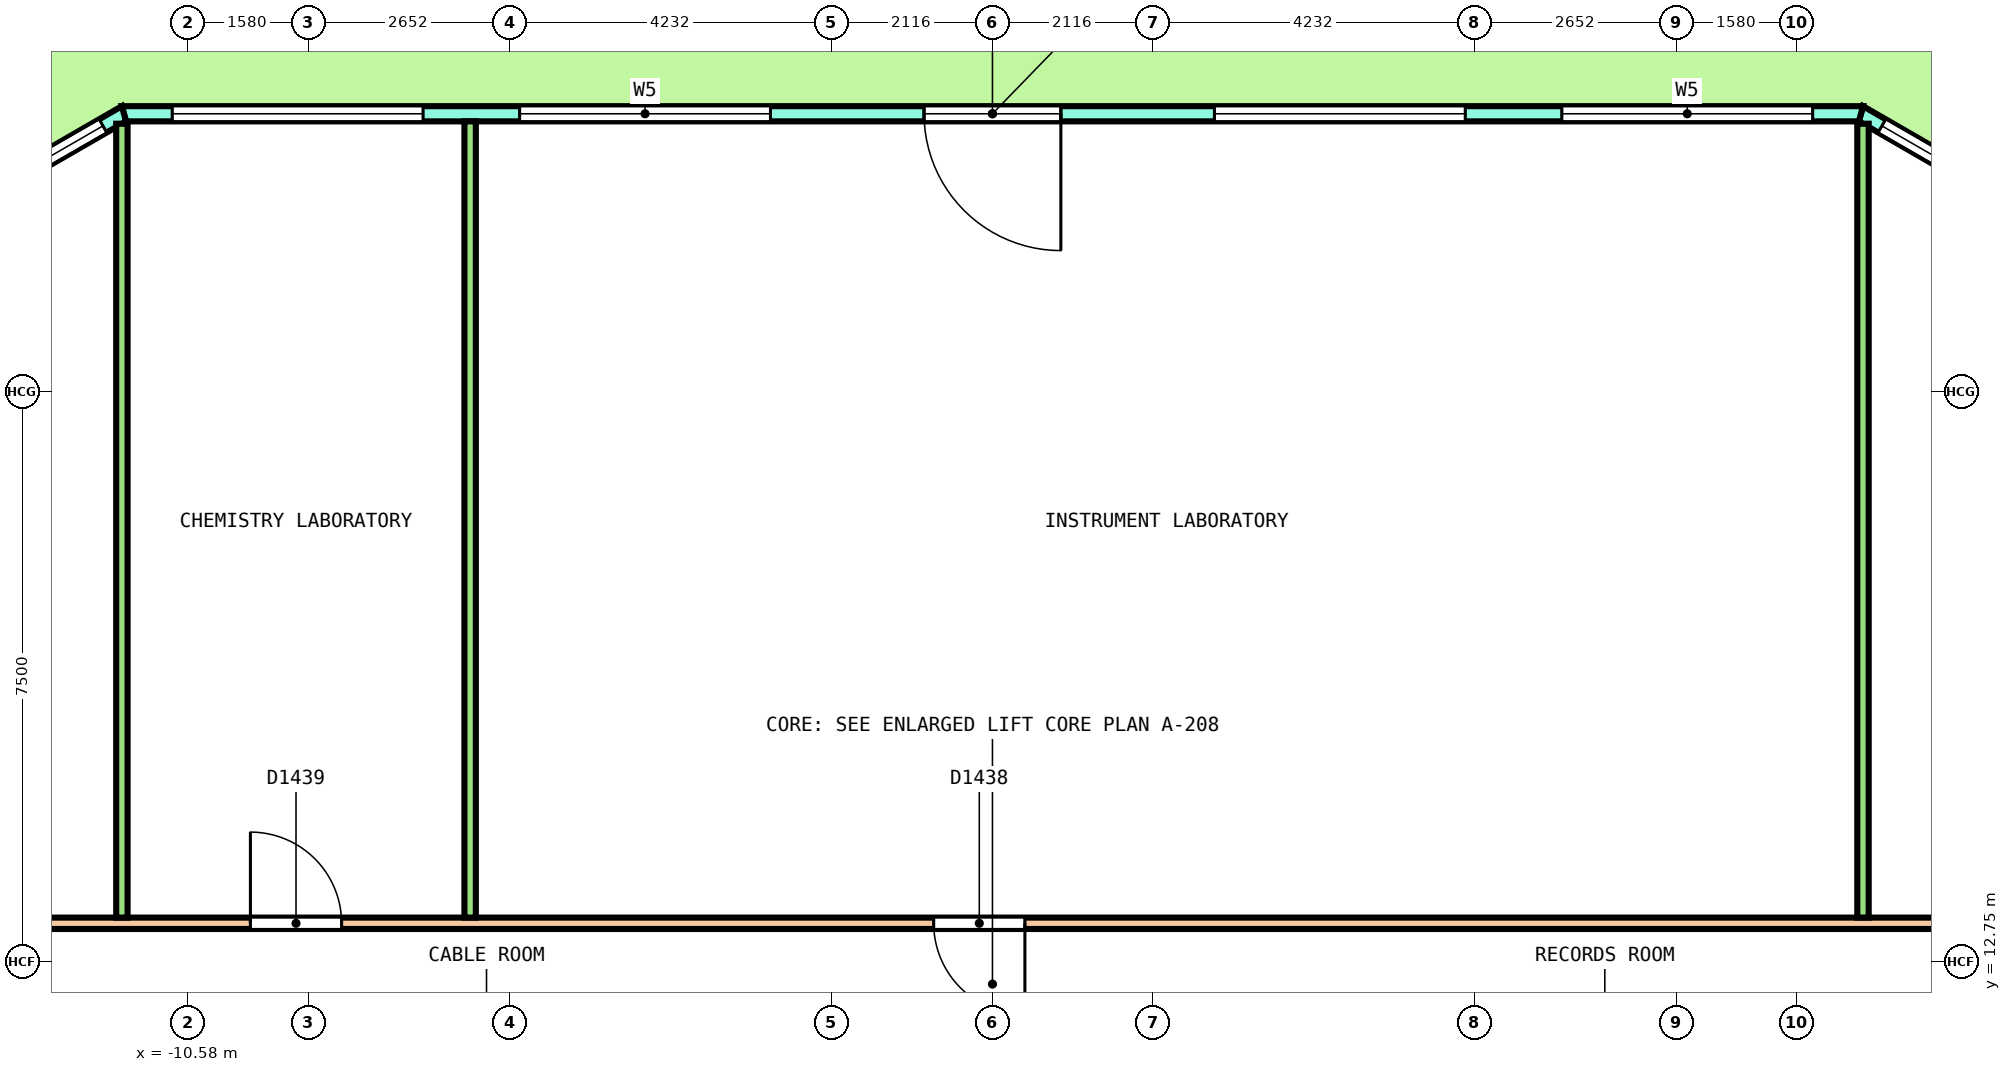
"""IFC4 building model, lengths in metres.
Left out: names, types, materials, properties, quantities, classifications, styles, units other than length and angle.
Written with IfcOpenShell. Run it as: python <this file> out.ifc"""

import sys

from ifc_helpers import new_model, si_unit, direction, frame, frame_2d, origin, place, context, subcontext, project, spatial, polyline, rectangle, outline, extrude, element, fill, save


model = new_model("IFC4")
c1 = context("Model", 3, precision=1e-05, world=origin(), true_north=direction((0.0, 1.0)))
c2 = subcontext(c1, "Body", "Model", "MODEL_VIEW")
j1 = project(units=[si_unit("LENGTHUNIT", "METRE"), si_unit("PLANEANGLEUNIT", "RADIAN")], contexts=[c1])
p1 = place(None, origin())
s1 = spatial("IfcSite", under=j1, at=p1, CompositionType="ELEMENT")
p2 = place(p1, origin())
s2 = spatial("IfcBuilding", under=s1, at=p2, CompositionType="ELEMENT")
p3 = place(p2, frame((0.0, 0.0, 58.6)))
s3 = spatial("IfcBuildingStorey", under=s2, at=p3, CompositionType="ELEMENT", Elevation=58.6)
p4 = place(p3, frame((17.38, 20.463, 0.0), z_axis=(0.0, 0.0, 1.0), x_axis=(-0.866029458321, 0.49999297727, 0.0)))
e1 = element("IfcWall", 1, at=p4, inside=s3, PredefinedType="SOLIDWALL", context=c2, shape_type="SweptSolid", body=[
    extrude(outline(polyline([(-0.027, -0.1), (1.128, -0.1), (2.282, -0.1), (3.437, -0.1), (4.592, -0.1), (5.747, -0.1), (6.901, -0.1), (6.848, 0.1), (5.711, 0.1), (4.574, 0.1), (3.437, 0.1), (2.301, 0.1), (1.164, 0.1), (0.027, 0.1), (-0.027, -0.1)])), origin(), (0.0, 0.0, 1.0), 4.1),
])
p5 = place(p4, frame((0.319, 0.0, 0.1)))
e2 = element("IfcOpeningElement", 2, at=p5, cuts=e1, PredefinedType="OPENING", context=c2, shape_type="SweptSolid", body=[
    extrude(rectangle(XDim=2.8, YDim=2.9, at=frame_2d((1.4, 1.45))), frame((0.0, 0.11, 0.0), z_axis=(0.0, -1.0, 0.0), x_axis=(1.0, 0.0, 0.0)), (0.0, 0.0, 1.0), 0.22),
])
p6 = place(p4, frame((3.756, 0.0, 0.1)))
e3 = element("IfcOpeningElement", 3, at=p6, cuts=e1, PredefinedType="OPENING", context=c2, shape_type="SweptSolid", body=[
    extrude(rectangle(XDim=2.8, YDim=2.9, at=frame_2d((1.4, 1.45))), frame((0.0, 0.11, 0.0), z_axis=(0.0, -1.0, 0.0), x_axis=(1.0, 0.0, 0.0)), (0.0, 0.0, 1.0), 0.22),
])
p7 = place(p3, frame((11.426, 23.9, 0.0), z_axis=(0.0, 0.0, 1.0), x_axis=(-1.0, 0.0, 0.0)))
e4 = element("IfcWall", 4, at=p7, inside=s3, PredefinedType="SOLIDWALL", context=c2, shape_type="SweptSolid", body=[
    extrude(outline(polyline([(-0.027, -0.1), (1.014, -0.1), (2.055, -0.1), (3.097, -0.1), (4.138, -0.1), (5.179, -0.1), (6.22, -0.1), (7.261, -0.1), (8.303, -0.1), (9.344, -0.1), (10.385, -0.1), (11.426, -0.1), (12.468, -0.1), (13.509, -0.1), (14.55, -0.1), (15.591, -0.1), (16.632, -0.1), (17.673, -0.1), (18.715, -0.1), (19.756, -0.1), (20.797, -0.1), (21.838, -0.1), (22.879, -0.1), (22.826, 0.1), (21.789, 0.1), (20.753, 0.1), (19.717, 0.1), (18.68, 0.1), (17.644, 0.1), (16.608, 0.1), (15.572, 0.1), (14.535, 0.1), (13.499, 0.1), (12.463, 0.1), (11.426, 0.1), (10.39, 0.1), (9.354, 0.1), (8.317, 0.1), (7.281, 0.1), (6.245, 0.1), (5.208, 0.1), (4.172, 0.1), (3.136, 0.1), (2.099, 0.1), (1.063, 0.1), (0.027, 0.1), (-0.027, -0.1)])), origin(), (0.0, 0.0, 1.0), 4.1),
])
p8 = place(p7, frame((0.635, 0.0, 0.1)))
e5 = element("IfcOpeningElement", 5, at=p8, cuts=e4, PredefinedType="OPENING", context=c2, shape_type="SweptSolid", body=[
    extrude(rectangle(XDim=3.3, YDim=2.9, at=frame_2d((1.65, 1.45))), frame((0.0, 0.11, 0.0), z_axis=(0.0, -1.0, 0.0), x_axis=(1.0, 0.0, 0.0)), (0.0, 0.0, 1.0), 0.22),
])
p9 = place(p7, frame((5.206, 0.0, 0.1)))
e6 = element("IfcOpeningElement", 6, at=p9, cuts=e4, PredefinedType="OPENING", context=c2, shape_type="SweptSolid", body=[
    extrude(rectangle(XDim=3.3, YDim=2.9, at=frame_2d((1.65, 1.45))), frame((0.0, 0.11, 0.0), z_axis=(0.0, -1.0, 0.0), x_axis=(1.0, 0.0, 0.0)), (0.0, 0.0, 1.0), 0.22),
])
p10 = place(p7, frame((10.526, 0.0, 0.0)))
e7 = element("IfcOpeningElement", 7, at=p10, cuts=e4, PredefinedType="OPENING", context=c2, shape_type="SweptSolid", body=[
    extrude(rectangle(XDim=1.8, YDim=2.4, at=frame_2d((0.9, 1.2))), frame((0.0, 0.11, 0.0), z_axis=(0.0, -1.0, 0.0), x_axis=(1.0, 0.0, 0.0)), (0.0, 0.0, 1.0), 0.22),
])
p11 = place(p7, frame((10.526, 0.0, 2.55)))
e8 = element("IfcOpeningElement", 8, at=p11, cuts=e4, PredefinedType="OPENING", context=c2, shape_type="SweptSolid", body=[
    extrude(rectangle(XDim=1.8, YDim=0.45, at=frame_2d((0.9, 0.225))), frame((0.0, 0.11, 0.0), z_axis=(0.0, -1.0, 0.0), x_axis=(1.0, 0.0, 0.0)), (0.0, 0.0, 1.0), 0.22),
])
p12 = place(p7, frame((14.347, 0.0, 0.1)))
e9 = element("IfcOpeningElement", 9, at=p12, cuts=e4, PredefinedType="OPENING", context=c2, shape_type="SweptSolid", body=[
    extrude(rectangle(XDim=3.3, YDim=2.9, at=frame_2d((1.65, 1.45))), frame((0.0, 0.11, 0.0), z_axis=(0.0, -1.0, 0.0), x_axis=(1.0, 0.0, 0.0)), (0.0, 0.0, 1.0), 0.22),
])
p13 = place(p7, frame((18.917, 0.0, 0.1)))
e10 = element("IfcOpeningElement", 10, at=p13, cuts=e4, PredefinedType="OPENING", context=c2, shape_type="SweptSolid", body=[
    extrude(rectangle(XDim=3.3, YDim=2.9, at=frame_2d((1.65, 1.45))), frame((0.0, 0.11, 0.0), z_axis=(0.0, -1.0, 0.0), x_axis=(1.0, 0.0, 0.0)), (0.0, 0.0, 1.0), 0.22),
])
p14 = place(p3, frame((-11.426, 23.9, 0.0), z_axis=(0.0, 0.0, 1.0), x_axis=(-0.866029458321, -0.49999297727, 0.0)))
e11 = element("IfcWall", 11, at=p14, inside=s3, PredefinedType="SOLIDWALL", context=c2, shape_type="SweptSolid", body=[
    extrude(outline(polyline([(-0.027, -0.1), (1.128, -0.1), (2.282, -0.1), (3.437, -0.1), (4.592, -0.1), (5.747, -0.1), (6.901, -0.1), (6.848, 0.1), (5.711, 0.1), (4.574, 0.1), (3.437, 0.1), (2.301, 0.1), (1.164, 0.1), (0.027, 0.1), (-0.027, -0.1)])), origin(), (0.0, 0.0, 1.0), 4.1),
])
p15 = place(p14, frame((0.319, 0.0, 0.1)))
e12 = element("IfcOpeningElement", 12, at=p15, cuts=e11, PredefinedType="OPENING", context=c2, shape_type="SweptSolid", body=[
    extrude(rectangle(XDim=2.8, YDim=2.9, at=frame_2d((1.4, 1.45))), frame((0.0, 0.11, 0.0), z_axis=(0.0, -1.0, 0.0), x_axis=(1.0, 0.0, 0.0)), (0.0, 0.0, 1.0), 0.22),
])
p16 = place(p14, frame((3.756, 0.0, 0.1)))
e13 = element("IfcOpeningElement", 13, at=p16, cuts=e11, PredefinedType="OPENING", context=c2, shape_type="SweptSolid", body=[
    extrude(rectangle(XDim=2.8, YDim=2.9, at=frame_2d((1.4, 1.45))), frame((0.0, 0.11, 0.0), z_axis=(0.0, -1.0, 0.0), x_axis=(1.0, 0.0, 0.0)), (0.0, 0.0, 1.0), 0.22),
])
p17 = place(p3, frame((-15.575, 13.25, 0.0), z_axis=(0.0, 0.0, 1.0), x_axis=(1.0, 0.0, 0.0)))
e14 = element("IfcWall", 14, at=p17, inside=s3, PredefinedType="PARTITIONING", context=c2, shape_type="SweptSolid", body=[
    extrude(rectangle(XDim=31.175, YDim=0.15, at=frame_2d((15.587, 0.0))), origin(), (0.0, 0.0, 1.0), 3.05),
])
p18 = place(p17, frame((28.252, 0.0, 0.0)))
e15 = element("IfcOpeningElement", 15, at=p18, cuts=e14, PredefinedType="OPENING", context=c2, shape_type="SweptSolid", body=[
    extrude(rectangle(XDim=1.0, YDim=2.1, at=frame_2d((0.5, 1.05))), frame((0.0, 0.085, 0.0), z_axis=(0.0, -1.0, 0.0), x_axis=(1.0, 0.0, 0.0)), (0.0, 0.0, 1.0), 0.17),
])
p19 = place(p17, frame((14.802, 0.0, 0.0)))
e16 = element("IfcOpeningElement", 16, at=p19, cuts=e14, PredefinedType="OPENING", context=c2, shape_type="SweptSolid", body=[
    extrude(rectangle(XDim=1.2, YDim=2.1, at=frame_2d((0.6, 1.05))), frame((0.0, 0.085, 0.0), z_axis=(0.0, -1.0, 0.0), x_axis=(1.0, 0.0, 0.0)), (0.0, 0.0, 1.0), 0.17),
])
p20 = place(p17, frame((5.812, 0.0, 0.0)))
e17 = element("IfcOpeningElement", 17, at=p20, cuts=e14, PredefinedType="OPENING", context=c2, shape_type="SweptSolid", body=[
    extrude(rectangle(XDim=1.2, YDim=2.1, at=frame_2d((0.6, 1.05))), frame((0.0, 0.085, 0.0), z_axis=(0.0, -1.0, 0.0), x_axis=(1.0, 0.0, 0.0)), (0.0, 0.0, 1.0), 0.17),
])
p21 = place(p17, frame((0.849, 0.0, 0.0)))
e18 = element("IfcOpeningElement", 18, at=p21, cuts=e14, PredefinedType="OPENING", context=c2, shape_type="SweptSolid", body=[
    extrude(rectangle(XDim=1.2, YDim=2.1, at=frame_2d((0.6, 1.05))), frame((0.0, 0.085, 0.0), z_axis=(0.0, -1.0, 0.0), x_axis=(1.0, 0.0, 0.0)), (0.0, 0.0, 1.0), 0.17),
])
p22 = place(p3, frame((11.453, 13.325, 0.0), z_axis=(0.0, 0.0, 1.0), x_axis=(0.0, 1.0, 0.0)))
e19 = element("IfcWall", 19, at=p22, inside=s3, PredefinedType="PARTITIONING", context=c2, shape_type="SweptSolid", body=[
    extrude(rectangle(XDim=10.444, YDim=0.15, at=frame_2d((5.222, 0.0))), origin(), (0.0, 0.0, 1.0), 3.05),
])
p23 = place(p3, frame((-6.872, 13.325, 0.0), z_axis=(0.0, 0.0, 1.0), x_axis=(0.0, 1.0, 0.0)))
e20 = element("IfcWall", 20, at=p23, inside=s3, PredefinedType="PARTITIONING", context=c2, shape_type="SweptSolid", body=[
    extrude(rectangle(XDim=10.475, YDim=0.15, at=frame_2d((5.238, 0.0))), origin(), (0.0, 0.0, 1.0), 3.05),
])
p24 = place(p3, frame((-11.453, 13.325, 0.0), z_axis=(0.0, 0.0, 1.0), x_axis=(0.0, 1.0, 0.0)))
e21 = element("IfcWall", 21, at=p24, inside=s3, PredefinedType="PARTITIONING", context=c2, shape_type="SweptSolid", body=[
    extrude(rectangle(XDim=10.444, YDim=0.15, at=frame_2d((5.222, 0.0))), origin(), (0.0, 0.0, 1.0), 3.05),
])
p25 = place(p6, origin())
e22 = element("IfcWindow", 22, at=p25, inside=s3, PartitioningType="SINGLE_PANEL", PredefinedType="WINDOW", context=c2, shape_type="SweptSolid", body=[
    extrude(rectangle(XDim=2.8, YDim=2.9, at=frame_2d((1.4, 1.45))), frame((0.0, 0.03, 0.0), z_axis=(0.0, -1.0, 0.0), x_axis=(1.0, 0.0, 0.0)), (0.0, 0.0, 1.0), 0.06),
])
fill(e3, e22)
p26 = place(p8, origin())
e23 = element("IfcWindow", 23, at=p26, inside=s3, PartitioningType="SINGLE_PANEL", PredefinedType="WINDOW", context=c2, shape_type="SweptSolid", body=[
    extrude(rectangle(XDim=3.3, YDim=2.9, at=frame_2d((1.65, 1.45))), frame((0.0, 0.03, 0.0), z_axis=(0.0, -1.0, 0.0), x_axis=(1.0, 0.0, 0.0)), (0.0, 0.0, 1.0), 0.06),
])
fill(e5, e23)
p27 = place(p9, origin())
e24 = element("IfcWindow", 24, at=p27, inside=s3, PartitioningType="SINGLE_PANEL", PredefinedType="WINDOW", context=c2, shape_type="SweptSolid", body=[
    extrude(rectangle(XDim=3.3, YDim=2.9, at=frame_2d((1.65, 1.45))), frame((0.0, 0.03, 0.0), z_axis=(0.0, -1.0, 0.0), x_axis=(1.0, 0.0, 0.0)), (0.0, 0.0, 1.0), 0.06),
])
fill(e6, e24)
p28 = place(p10, origin())
e25 = element("IfcDoor", 25, at=p28, inside=s3, OperationType="DOUBLE_DOOR_SINGLE_SWING", PredefinedType="DOOR", context=c2, shape_type="SweptSolid", body=[
    extrude(rectangle(XDim=1.8, YDim=2.4, at=frame_2d((0.9, 1.2))), frame((0.0, 0.025, 0.0), z_axis=(0.0, -1.0, 0.0), x_axis=(1.0, 0.0, 0.0)), (0.0, 0.0, 1.0), 0.05),
])
fill(e7, e25)
p29 = place(p11, origin())
e26 = element("IfcWindow", 26, at=p29, inside=s3, PartitioningType="SINGLE_PANEL", PredefinedType="WINDOW", context=c2, shape_type="SweptSolid", body=[
    extrude(rectangle(XDim=1.8, YDim=0.45, at=frame_2d((0.9, 0.225))), frame((0.0, 0.03, 0.0), z_axis=(0.0, -1.0, 0.0), x_axis=(1.0, 0.0, 0.0)), (0.0, 0.0, 1.0), 0.06),
])
fill(e8, e26)
p30 = place(p12, origin())
e27 = element("IfcWindow", 27, at=p30, inside=s3, PartitioningType="SINGLE_PANEL", PredefinedType="WINDOW", context=c2, shape_type="SweptSolid", body=[
    extrude(rectangle(XDim=3.3, YDim=2.9, at=frame_2d((1.65, 1.45))), frame((0.0, 0.03, 0.0), z_axis=(0.0, -1.0, 0.0), x_axis=(1.0, 0.0, 0.0)), (0.0, 0.0, 1.0), 0.06),
])
fill(e9, e27)
p31 = place(p13, origin())
e28 = element("IfcWindow", 28, at=p31, inside=s3, PartitioningType="SINGLE_PANEL", PredefinedType="WINDOW", context=c2, shape_type="SweptSolid", body=[
    extrude(rectangle(XDim=3.3, YDim=2.9, at=frame_2d((1.65, 1.45))), frame((0.0, 0.03, 0.0), z_axis=(0.0, -1.0, 0.0), x_axis=(1.0, 0.0, 0.0)), (0.0, 0.0, 1.0), 0.06),
])
fill(e10, e28)
p32 = place(p15, origin())
e29 = element("IfcWindow", 29, at=p32, inside=s3, PartitioningType="SINGLE_PANEL", PredefinedType="WINDOW", context=c2, shape_type="SweptSolid", body=[
    extrude(rectangle(XDim=2.8, YDim=2.9, at=frame_2d((1.4, 1.45))), frame((0.0, 0.03, 0.0), z_axis=(0.0, -1.0, 0.0), x_axis=(1.0, 0.0, 0.0)), (0.0, 0.0, 1.0), 0.06),
])
fill(e12, e29)
p33 = place(p19, origin())
e30 = element("IfcDoor", 30, at=p33, inside=s3, OperationType="DOUBLE_DOOR_SINGLE_SWING", PredefinedType="DOOR", context=c2, shape_type="SweptSolid", body=[
    extrude(rectangle(XDim=1.2, YDim=2.1, at=frame_2d((0.6, 1.05))), frame((0.0, 0.025, 0.0), z_axis=(0.0, -1.0, 0.0), x_axis=(1.0, 0.0, 0.0)), (0.0, 0.0, 1.0), 0.05),
])
fill(e16, e30)
p34 = place(p20, origin())
e31 = element("IfcDoor", 31, at=p34, inside=s3, OperationType="DOUBLE_DOOR_SINGLE_SWING", PredefinedType="DOOR", context=c2, shape_type="SweptSolid", body=[
    extrude(rectangle(XDim=1.2, YDim=2.1, at=frame_2d((0.6, 1.05))), frame((0.0, 0.025, 0.0), z_axis=(0.0, -1.0, 0.0), x_axis=(1.0, 0.0, 0.0)), (0.0, 0.0, 1.0), 0.05),
])
fill(e17, e31)
save(model, sys.argv[1])
